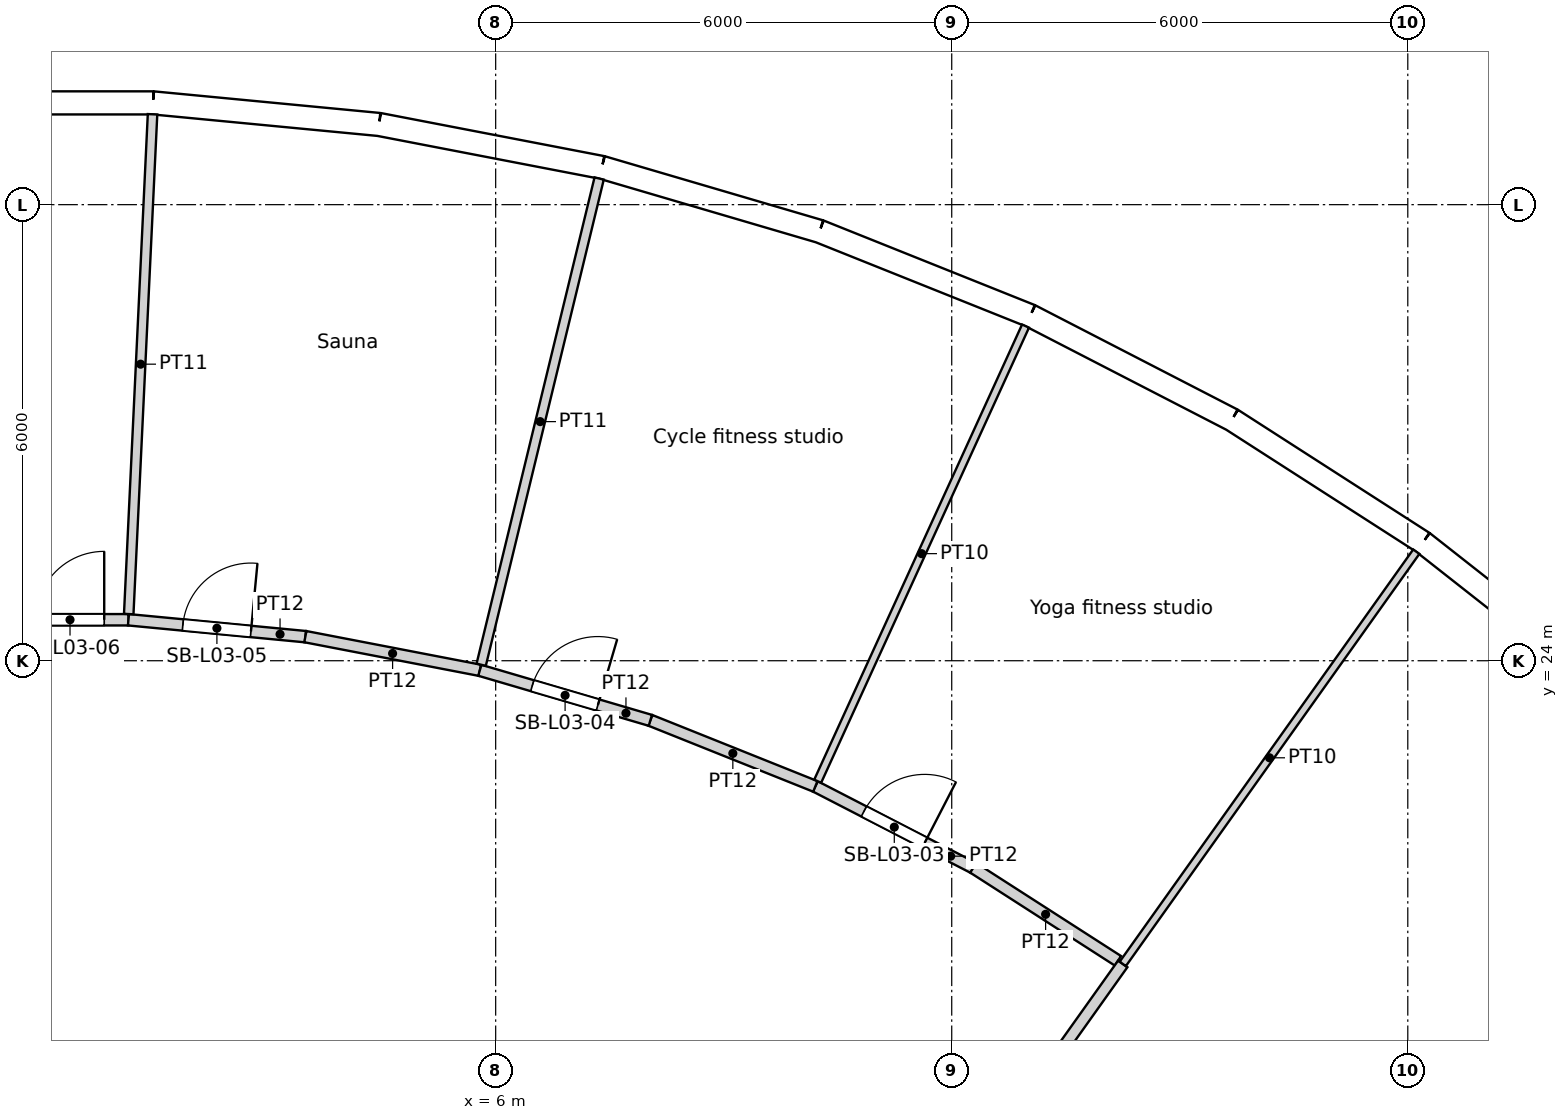
"""IFC4 building model, lengths in metres.
Left out: names, types, materials, properties, quantities, classifications, styles, units other than length and angle.
Written with IfcOpenShell. Run it as: python <this file> out.ifc"""

import sys

from ifc_helpers import new_model, si_unit, direction, frame, frame_2d, origin, origin_2d, place, context, subcontext, project, spatial, rectangle, circle, extrude, element, fill, save


model = new_model("IFC4")
c1 = context("Model", 3, precision=1e-05, world=origin(), true_north=direction((0.0, 1.0)))
c2 = subcontext(c1, "Body", "Model", "MODEL_VIEW")
j1 = project(units=[si_unit("LENGTHUNIT", "METRE"), si_unit("PLANEANGLEUNIT", "RADIAN")], contexts=[c1])
p1 = place(None, origin())
s1 = spatial("IfcSite", under=j1, at=p1, CompositionType="ELEMENT")
p2 = place(p1, origin())
s2 = spatial("IfcBuilding", under=s1, at=p2, CompositionType="ELEMENT")
p3 = place(p2, frame((0.0, 0.0, 18.6)))
s3 = spatial("IfcBuildingStorey", under=s2, at=p3, CompositionType="ELEMENT", Elevation=18.6)
for number, where, z_axis, x_axis in (
    (1, (17.561, 24.661, 0.0), (0.0, 0.0, 1.0), (1.0, 0.0, 0.0)),
    (2, (12.576, 27.539, 0.0), (0.0, 0.0, 1.0), (1.0, 0.0, 0.0)),
    (3, (7.137, 29.421, 0.0), (0.0, 0.0, 1.0), (1.0, 0.0, 0.0)),
    (4, (1.44, 30.24, 0.0), (0.0, 0.0, 1.0), (1.0, 0.0, 0.0)),
):
    element("IfcColumn", number, at=place(p3, frame(where, z_axis=z_axis, x_axis=x_axis)), inside=s3, PredefinedType="COLUMN", context=c2, shape_type="SweptSolid", body=[
        extrude(circle(Radius=0.7, at=origin_2d()), origin(), (0.0, 0.0, 1.0), 4.8),
    ])
for number, where, z_axis, x_axis in (
    (5, (14.659, 19.69, 0.0), (0.0, 0.0, 1.0), (1.0, 0.0, 0.0)),
    (6, (9.723, 22.54, 0.0), (0.0, 0.0, 1.0), (1.0, 0.0, 0.0)),
    (7, (4.263, 24.175, 0.0), (0.0, 0.0, 1.0), (1.0, 0.0, 0.0)),
):
    element("IfcColumn", number, at=place(p3, frame(where, z_axis=z_axis, x_axis=x_axis)), inside=s3, PredefinedType="COLUMN", context=c2, shape_type="SweptSolid", body=[
        extrude(circle(Radius=0.75, at=origin_2d()), origin(), (0.0, 0.0, 1.0), 4.8),
    ])
p4 = place(p3, frame((1.406, 18.77, 0.0), z_axis=(0.0, 0.0, 1.0), x_axis=(1.0, 0.0, 0.0)))
e8 = element("IfcColumn", 8, at=p4, inside=s3, PredefinedType="COLUMN", context=c2, shape_type="SweptSolid", body=[
    extrude(circle(Radius=0.8, at=origin_2d()), origin(), (0.0, 0.0, 1.0), 4.8),
])
p5 = place(p3, frame((20.546, 23.711, 0.0), z_axis=(0.0, 0.0, 1.0), x_axis=(-0.786043032847, 0.618171780747, 0.0)))
e9 = element("IfcWall", 9, at=p5, inside=s3, PredefinedType="SOLIDWALL", context=c2, shape_type="SweptSolid", body=[
    extrude(rectangle(XDim=2.986, YDim=0.3, at=frame_2d((1.493, 0.0))), origin(), (0.0, 0.0, 1.0), 4.35),
])
p6 = place(p5, frame((1.493, 0.0, 2.0)))
e10 = element("IfcOpeningElement", 10, at=p6, cuts=e9, PredefinedType="OPENING", context=c2, shape_type="SweptSolid", body=[
    extrude(circle(Radius=1.2, at=origin_2d()), frame((0.0, 0.16, 0.0), z_axis=(0.0, -1.0, 0.0), x_axis=(1.0, 0.0, 0.0)), (0.0, 0.0, 1.0), 0.32),
])
p7 = place(p3, frame((18.199, 25.557, 0.0), z_axis=(0.0, 0.0, 1.0), x_axis=(-0.841242231846, 0.540658401727, 0.0)))
e11 = element("IfcWall", 11, at=p7, inside=s3, PredefinedType="SOLIDWALL", context=c2, shape_type="SweptSolid", body=[
    extrude(rectangle(XDim=2.986, YDim=0.3, at=frame_2d((1.493, 0.0))), origin(), (0.0, 0.0, 1.0), 4.35),
])
p8 = place(p7, frame((1.493, 0.0, 2.0)))
e12 = element("IfcOpeningElement", 12, at=p8, cuts=e11, PredefinedType="OPENING", context=c2, shape_type="SweptSolid", body=[
    extrude(circle(Radius=1.2, at=origin_2d()), frame((0.0, 0.16, 0.0), z_axis=(0.0, -1.0, 0.0), x_axis=(1.0, 0.0, 0.0)), (0.0, 0.0, 1.0), 0.32),
])
p9 = place(p3, frame((15.687, 27.171, 0.0), z_axis=(0.0, 0.0, 1.0), x_axis=(-0.888831268481, 0.458234630043, 0.0)))
e13 = element("IfcWall", 13, at=p9, inside=s3, PredefinedType="SOLIDWALL", context=c2, shape_type="SweptSolid", body=[
    extrude(rectangle(XDim=2.986, YDim=0.3, at=frame_2d((1.493, 0.0))), origin(), (0.0, 0.0, 1.0), 4.35),
])
p10 = place(p9, frame((1.493, 0.0, 2.0)))
e14 = element("IfcOpeningElement", 14, at=p10, cuts=e13, PredefinedType="OPENING", context=c2, shape_type="SweptSolid", body=[
    extrude(circle(Radius=1.2, at=origin_2d()), frame((0.0, 0.16, 0.0), z_axis=(0.0, -1.0, 0.0), x_axis=(1.0, 0.0, 0.0)), (0.0, 0.0, 1.0), 0.32),
])
p11 = place(p3, frame((13.033, 28.539, 0.0), z_axis=(0.0, 0.0, 1.0), x_axis=(-0.928380795373, 0.371630325434, 0.0)))
e15 = element("IfcWall", 15, at=p11, inside=s3, PredefinedType="SOLIDWALL", context=c2, shape_type="SweptSolid", body=[
    extrude(rectangle(XDim=2.986, YDim=0.3, at=frame_2d((1.493, 0.0))), origin(), (0.0, 0.0, 1.0), 4.35),
])
p12 = place(p11, frame((1.493, 0.0, 2.0)))
e16 = element("IfcOpeningElement", 16, at=p12, cuts=e15, PredefinedType="OPENING", context=c2, shape_type="SweptSolid", body=[
    extrude(circle(Radius=1.2, at=origin_2d()), frame((0.0, 0.16, 0.0), z_axis=(0.0, -1.0, 0.0), x_axis=(1.0, 0.0, 0.0)), (0.0, 0.0, 1.0), 0.32),
])
p13 = place(p3, frame((10.261, 29.649, 0.0), z_axis=(0.0, 0.0, 1.0), x_axis=(-0.959502108153, 0.281701445593, 0.0)))
e17 = element("IfcWall", 17, at=p13, inside=s3, PredefinedType="SOLIDWALL", context=c2, shape_type="SweptSolid", body=[
    extrude(rectangle(XDim=2.986, YDim=0.3, at=frame_2d((1.493, 0.0))), origin(), (0.0, 0.0, 1.0), 4.35),
])
p14 = place(p13, frame((1.493, 0.0, 2.0)))
e18 = element("IfcOpeningElement", 18, at=p14, cuts=e17, PredefinedType="OPENING", context=c2, shape_type="SweptSolid", body=[
    extrude(circle(Radius=1.2, at=origin_2d()), frame((0.0, 0.16, 0.0), z_axis=(0.0, -1.0, 0.0), x_axis=(1.0, 0.0, 0.0)), (0.0, 0.0, 1.0), 0.32),
])
p15 = place(p3, frame((7.397, 30.49, 0.0), z_axis=(0.0, 0.0, 1.0), x_axis=(-0.981918853666, 0.189302310646, 0.0)))
e19 = element("IfcWall", 19, at=p15, inside=s3, PredefinedType="SOLIDWALL", context=c2, shape_type="SweptSolid", body=[
    extrude(rectangle(XDim=2.986, YDim=0.3, at=frame_2d((1.493, 0.0))), origin(), (0.0, 0.0, 1.0), 4.35),
])
p16 = place(p15, frame((1.493, 0.0, 2.0)))
e20 = element("IfcOpeningElement", 20, at=p16, cuts=e19, PredefinedType="OPENING", context=c2, shape_type="SweptSolid", body=[
    extrude(circle(Radius=1.2, at=origin_2d()), frame((0.0, 0.16, 0.0), z_axis=(0.0, -1.0, 0.0), x_axis=(1.0, 0.0, 0.0)), (0.0, 0.0, 1.0), 0.32),
])
p17 = place(p3, frame((4.465, 31.055, 0.0), z_axis=(0.0, 0.0, 1.0), x_axis=(-0.99547560533, 0.095017467833, 0.0)))
e21 = element("IfcWall", 21, at=p17, inside=s3, PredefinedType="SOLIDWALL", context=c2, shape_type="SweptSolid", body=[
    extrude(rectangle(XDim=2.986, YDim=0.3, at=frame_2d((1.493, 0.0))), origin(), (0.0, 0.0, 1.0), 4.35),
])
p18 = place(p17, frame((1.493, 0.0, 2.0)))
e22 = element("IfcOpeningElement", 22, at=p18, cuts=e21, PredefinedType="OPENING", context=c2, shape_type="SweptSolid", body=[
    extrude(circle(Radius=1.2, at=origin_2d()), frame((0.0, 0.16, 0.0), z_axis=(0.0, -1.0, 0.0), x_axis=(1.0, 0.0, 0.0)), (0.0, 0.0, 1.0), 0.32),
])
p19 = place(p3, frame((1.493, 31.339, 0.0), z_axis=(0.0, 0.0, 1.0), x_axis=(-1.0, 0.0, 0.0)))
e23 = element("IfcWall", 23, at=p19, inside=s3, PredefinedType="SOLIDWALL", context=c2, shape_type="SweptSolid", body=[
    extrude(rectangle(XDim=2.986, YDim=0.3, at=frame_2d((1.493, 0.0))), origin(), (0.0, 0.0, 1.0), 4.35),
])
p20 = place(p19, frame((1.493, 0.0, 2.0)))
e24 = element("IfcOpeningElement", 24, at=p20, cuts=e23, PredefinedType="OPENING", context=c2, shape_type="SweptSolid", body=[
    extrude(circle(Radius=1.2, at=origin_2d()), frame((0.0, 0.16, 0.0), z_axis=(0.0, -1.0, 0.0), x_axis=(1.0, 0.0, 0.0)), (0.0, 0.0, 1.0), 0.32),
])
p21 = place(p3, frame((-1.169, 24.539, 0.0), z_axis=(0.0, 0.0, 1.0), x_axis=(1.0, 0.0, 0.0)))
e25 = element("IfcWall", 25, at=p21, inside=s3, PredefinedType="PARTITIONING", context=c2, shape_type="SweptSolid", body=[
    extrude(rectangle(XDim=2.338, YDim=0.15, at=frame_2d((1.169, 0.0))), origin(), (0.0, 0.0, 1.0), 3.75),
])
p22 = place(p21, frame((1.119, 0.0, 0.0)))
e26 = element("IfcOpeningElement", 26, at=p22, cuts=e25, PredefinedType="OPENING", context=c2, shape_type="SweptSolid", body=[
    extrude(rectangle(XDim=0.9, YDim=2.1, at=frame_2d((0.45, 1.05))), frame((0.0, 0.075, 0.0), z_axis=(0.0, -1.0, 0.0), x_axis=(1.0, 0.0, 0.0)), (0.0, 0.0, 1.0), 0.15),
])
p23 = place(p3, frame((1.486, 31.189, 0.0), z_axis=(0.0, 0.0, 1.0), x_axis=(-0.047549289688, -0.998868892823, 0.0)))
e27 = element("IfcWall", 27, at=p23, inside=s3, PredefinedType="PARTITIONING", context=c2, shape_type="SweptSolid", body=[
    extrude(rectangle(XDim=6.582, YDim=0.125, at=frame_2d((3.291, 0.0))), origin(), (0.0, 0.0, 1.0), 3.75),
])
p24 = place(p3, frame((1.169, 24.539, 0.0), z_axis=(0.0, 0.0, 1.0), x_axis=(0.995473855736, -0.095035796131, 0.0)))
e28 = element("IfcWall", 28, at=p24, inside=s3, PredefinedType="PARTITIONING", context=c2, shape_type="SweptSolid", body=[
    extrude(rectangle(XDim=2.338, YDim=0.15, at=frame_2d((1.169, 0.0))), origin(), (0.0, 0.0, 1.0), 3.75),
])
p25 = place(p24, frame((0.719, 0.0, 0.0)))
e29 = element("IfcOpeningElement", 29, at=p25, cuts=e28, PredefinedType="OPENING", context=c2, shape_type="SweptSolid", body=[
    extrude(rectangle(XDim=0.9, YDim=2.1, at=frame_2d((0.45, 1.05))), frame((0.0, 0.075, 0.0), z_axis=(0.0, -1.0, 0.0), x_axis=(1.0, 0.0, 0.0)), (0.0, 0.0, 1.0), 0.15),
])
p26 = place(p3, frame((5.792, 23.874, 0.0), z_axis=(0.0, 0.0, 1.0), x_axis=(-0.981934124814, 0.189223081374, 0.0)))
e30 = element("IfcWall", 30, at=p26, inside=s3, PredefinedType="PARTITIONING", context=c2, shape_type="SweptSolid", body=[
    extrude(rectangle(XDim=2.338, YDim=0.15, at=frame_2d((1.169, 0.0))), origin(), (0.0, 0.0, 1.0), 3.75),
])
p27 = place(p3, frame((7.361, 30.344, 0.0), z_axis=(0.0, 0.0, 1.0), x_axis=(-0.235748643115, -0.971814065174, 0.0)))
e31 = element("IfcWall", 31, at=p27, inside=s3, PredefinedType="PARTITIONING", context=c2, shape_type="SweptSolid", body=[
    extrude(rectangle(XDim=6.582, YDim=0.125, at=frame_2d((3.291, 0.0))), origin(), (0.0, 0.0, 1.0), 3.75),
])
p28 = place(p3, frame((5.792, 23.874, 0.0), z_axis=(0.0, 0.0, 1.0), x_axis=(0.959488462959, -0.28174791827, 0.0)))
e32 = element("IfcWall", 32, at=p28, inside=s3, PredefinedType="PARTITIONING", context=c2, shape_type="SweptSolid", body=[
    extrude(rectangle(XDim=2.338, YDim=0.15, at=frame_2d((1.169, 0.0))), origin(), (0.0, 0.0, 1.0), 3.75),
])
p29 = place(p28, frame((0.719, 0.0, 0.0)))
e33 = element("IfcOpeningElement", 33, at=p29, cuts=e32, PredefinedType="OPENING", context=c2, shape_type="SweptSolid", body=[
    extrude(rectangle(XDim=0.9, YDim=2.1, at=frame_2d((0.45, 1.05))), frame((0.0, 0.075, 0.0), z_axis=(0.0, -1.0, 0.0), x_axis=(1.0, 0.0, 0.0)), (0.0, 0.0, 1.0), 0.15),
])
p30 = place(p3, frame((10.205, 22.347, 0.0), z_axis=(0.0, 0.0, 1.0), x_axis=(-0.92836862221, 0.371660734133, 0.0)))
e34 = element("IfcWall", 34, at=p30, inside=s3, PredefinedType="PARTITIONING", context=c2, shape_type="SweptSolid", body=[
    extrude(rectangle(XDim=2.338, YDim=0.15, at=frame_2d((1.169, 0.0))), origin(), (0.0, 0.0, 1.0), 3.75),
])
p31 = place(p3, frame((10.205, 22.347, 0.0), z_axis=(0.0, 0.0, 1.0), x_axis=(0.888845697941, -0.458206640339, 0.0)))
e35 = element("IfcWall", 35, at=p31, inside=s3, PredefinedType="PARTITIONING", context=c2, shape_type="SweptSolid", body=[
    extrude(rectangle(XDim=2.338, YDim=0.15, at=frame_2d((1.169, 0.0))), origin(), (0.0, 0.0, 1.0), 3.75),
])
p32 = place(p31, frame((0.719, 0.0, 0.0)))
e36 = element("IfcOpeningElement", 36, at=p32, cuts=e35, PredefinedType="OPENING", context=c2, shape_type="SweptSolid", body=[
    extrude(rectangle(XDim=0.9, YDim=2.1, at=frame_2d((0.45, 1.05))), frame((0.0, 0.075, 0.0), z_axis=(0.0, -1.0, 0.0), x_axis=(1.0, 0.0, 0.0)), (0.0, 0.0, 1.0), 0.15),
])
p33 = place(p3, frame((12.971, 28.403, 0.0), z_axis=(0.0, 0.0, 1.0), x_axis=(-0.415409113983, -0.909634689323, 0.0)))
e37 = element("IfcWall", 37, at=p33, inside=s3, PredefinedType="PARTITIONING", context=c2, shape_type="SweptSolid", body=[
    extrude(rectangle(XDim=6.582, YDim=0.1, at=frame_2d((3.291, 0.0))), origin(), (0.0, 0.0, 1.0), 3.75),
])
p34 = place(p3, frame((14.25, 20.011, 0.0), z_axis=(0.0, 0.0, 1.0), x_axis=(-0.580061892899, -0.814572403416, 0.0)))
e38 = element("IfcWall", 38, at=p34, inside=s3, PredefinedType="PARTITIONING", context=c2, shape_type="SweptSolid", body=[
    extrude(rectangle(XDim=9.252, YDim=0.15, at=frame_2d((4.626, 0.0))), origin(), (0.0, 0.0, 1.0), 3.75),
])
p35 = place(p3, frame((14.187, 20.052, 0.0), z_axis=(0.0, 0.0, 1.0), x_axis=(-0.841245074687, 0.540653978358, 0.0)))
e39 = element("IfcWall", 39, at=p35, inside=s3, PredefinedType="PARTITIONING", context=c2, shape_type="SweptSolid", body=[
    extrude(rectangle(XDim=2.263, YDim=0.15, at=frame_2d((1.131, 0.0))), origin(), (0.0, 0.0, 1.0), 3.75),
])
p36 = place(p3, frame((18.112, 25.435, 0.0), z_axis=(0.0, 0.0, 1.0), x_axis=(-0.580061637508, -0.814572585281, 0.0)))
e40 = element("IfcWall", 40, at=p36, inside=s3, PredefinedType="PARTITIONING", context=c2, shape_type="SweptSolid", body=[
    extrude(rectangle(XDim=6.658, YDim=0.1, at=frame_2d((3.329, 0.0))), origin(), (0.0, 0.0, 1.0), 3.75),
])
p37 = place(p6, origin())
e41 = element("IfcWindow", 41, at=p37, inside=s3, PartitioningType="SINGLE_PANEL", PredefinedType="WINDOW", context=c2, shape_type="SweptSolid", body=[
    extrude(circle(Radius=1.2, at=origin_2d()), frame((0.0, 0.12, 0.0), z_axis=(0.0, -1.0, 0.0), x_axis=(1.0, 0.0, 0.0)), (0.0, 0.0, 1.0), 0.1),
])
fill(e10, e41)
p38 = place(p8, origin())
e42 = element("IfcWindow", 42, at=p38, inside=s3, PartitioningType="SINGLE_PANEL", PredefinedType="WINDOW", context=c2, shape_type="SweptSolid", body=[
    extrude(circle(Radius=1.2, at=origin_2d()), frame((0.0, 0.12, 0.0), z_axis=(0.0, -1.0, 0.0), x_axis=(1.0, 0.0, 0.0)), (0.0, 0.0, 1.0), 0.1),
])
fill(e12, e42)
p39 = place(p10, origin())
e43 = element("IfcWindow", 43, at=p39, inside=s3, PartitioningType="SINGLE_PANEL", PredefinedType="WINDOW", context=c2, shape_type="SweptSolid", body=[
    extrude(circle(Radius=1.2, at=origin_2d()), frame((0.0, 0.12, 0.0), z_axis=(0.0, -1.0, 0.0), x_axis=(1.0, 0.0, 0.0)), (0.0, 0.0, 1.0), 0.1),
])
fill(e14, e43)
p40 = place(p12, origin())
e44 = element("IfcWindow", 44, at=p40, inside=s3, PartitioningType="SINGLE_PANEL", PredefinedType="WINDOW", context=c2, shape_type="SweptSolid", body=[
    extrude(circle(Radius=1.2, at=origin_2d()), frame((0.0, 0.12, 0.0), z_axis=(0.0, -1.0, 0.0), x_axis=(1.0, 0.0, 0.0)), (0.0, 0.0, 1.0), 0.1),
])
fill(e16, e44)
p41 = place(p14, origin())
e45 = element("IfcWindow", 45, at=p41, inside=s3, PartitioningType="SINGLE_PANEL", PredefinedType="WINDOW", context=c2, shape_type="SweptSolid", body=[
    extrude(circle(Radius=1.2, at=origin_2d()), frame((0.0, 0.12, 0.0), z_axis=(0.0, -1.0, 0.0), x_axis=(1.0, 0.0, 0.0)), (0.0, 0.0, 1.0), 0.1),
])
fill(e18, e45)
p42 = place(p16, origin())
e46 = element("IfcWindow", 46, at=p42, inside=s3, PartitioningType="SINGLE_PANEL", PredefinedType="WINDOW", context=c2, shape_type="SweptSolid", body=[
    extrude(circle(Radius=1.2, at=origin_2d()), frame((0.0, 0.12, 0.0), z_axis=(0.0, -1.0, 0.0), x_axis=(1.0, 0.0, 0.0)), (0.0, 0.0, 1.0), 0.1),
])
fill(e20, e46)
p43 = place(p18, origin())
e47 = element("IfcWindow", 47, at=p43, inside=s3, PartitioningType="SINGLE_PANEL", PredefinedType="WINDOW", context=c2, shape_type="SweptSolid", body=[
    extrude(circle(Radius=1.2, at=origin_2d()), frame((0.0, 0.12, 0.0), z_axis=(0.0, -1.0, 0.0), x_axis=(1.0, 0.0, 0.0)), (0.0, 0.0, 1.0), 0.1),
])
fill(e22, e47)
p44 = place(p20, origin())
e48 = element("IfcWindow", 48, at=p44, inside=s3, PartitioningType="SINGLE_PANEL", PredefinedType="WINDOW", context=c2, shape_type="SweptSolid", body=[
    extrude(circle(Radius=1.2, at=origin_2d()), frame((0.0, 0.12, 0.0), z_axis=(0.0, -1.0, 0.0), x_axis=(1.0, 0.0, 0.0)), (0.0, 0.0, 1.0), 0.1),
])
fill(e24, e48)
p45 = place(p32, origin())
e49 = element("IfcDoor", 49, at=p45, inside=s3, OperationType="SINGLE_SWING_RIGHT", PredefinedType="DOOR", context=c2, shape_type="SweptSolid", body=[
    extrude(rectangle(XDim=0.9, YDim=2.1, at=frame_2d((0.45, 1.05))), frame((0.0, 0.025, 0.0), z_axis=(0.0, -1.0, 0.0), x_axis=(1.0, 0.0, 0.0)), (0.0, 0.0, 1.0), 0.05),
])
fill(e36, e49)
p46 = place(p29, origin())
e50 = element("IfcDoor", 50, at=p46, inside=s3, OperationType="SINGLE_SWING_RIGHT", PredefinedType="DOOR", context=c2, shape_type="SweptSolid", body=[
    extrude(rectangle(XDim=0.9, YDim=2.1, at=frame_2d((0.45, 1.05))), frame((0.0, 0.025, 0.0), z_axis=(0.0, -1.0, 0.0), x_axis=(1.0, 0.0, 0.0)), (0.0, 0.0, 1.0), 0.05),
])
fill(e33, e50)
p47 = place(p25, origin())
e51 = element("IfcDoor", 51, at=p47, inside=s3, OperationType="SINGLE_SWING_RIGHT", PredefinedType="DOOR", context=c2, shape_type="SweptSolid", body=[
    extrude(rectangle(XDim=0.9, YDim=2.1, at=frame_2d((0.45, 1.05))), frame((0.0, 0.025, 0.0), z_axis=(0.0, -1.0, 0.0), x_axis=(1.0, 0.0, 0.0)), (0.0, 0.0, 1.0), 0.05),
])
fill(e29, e51)
p48 = place(p22, origin())
e52 = element("IfcDoor", 52, at=p48, inside=s3, OperationType="SINGLE_SWING_RIGHT", PredefinedType="DOOR", context=c2, shape_type="SweptSolid", body=[
    extrude(rectangle(XDim=0.9, YDim=2.1, at=frame_2d((0.45, 1.05))), frame((0.0, 0.025, 0.0), z_axis=(0.0, -1.0, 0.0), x_axis=(1.0, 0.0, 0.0)), (0.0, 0.0, 1.0), 0.05),
])
fill(e26, e52)
save(model, sys.argv[1])
